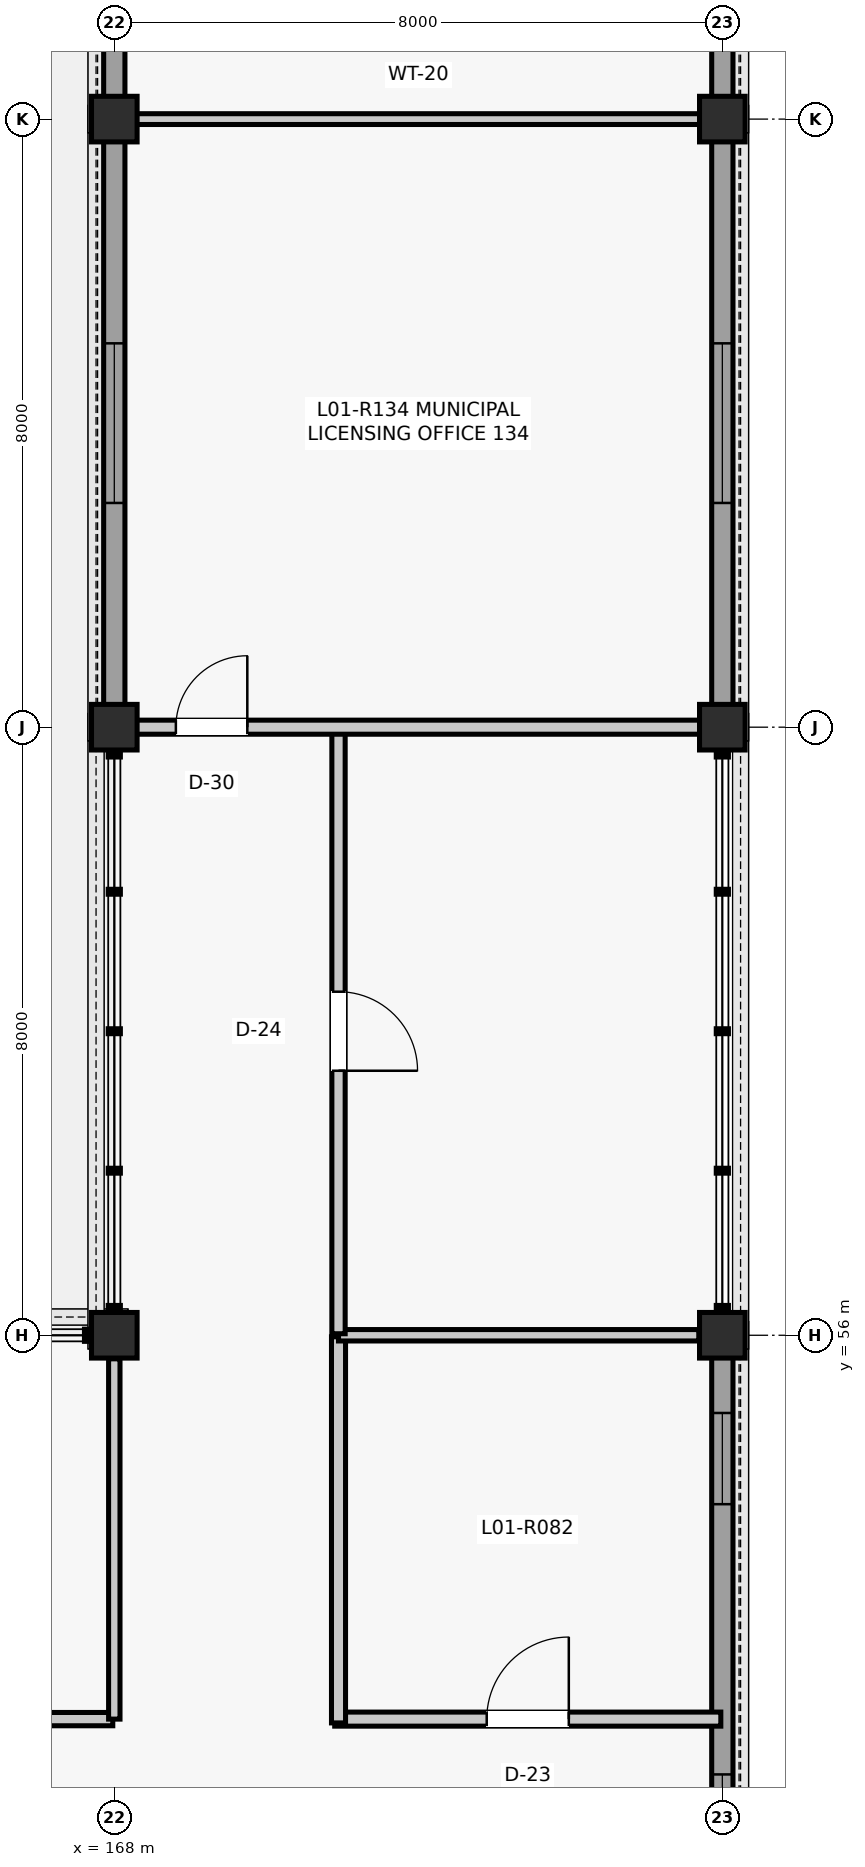
"""IFC4 building model, lengths in metres.
Left out: names, types, materials, properties, quantities, classifications, styles, units other than length and angle.
Written with IfcOpenShell. Run it as: python <this file> out.ifc"""

import sys

from ifc_helpers import new_model, si_unit, direction, frame, frame_2d, origin, origin_2d, place, context, subcontext, project, spatial, rectangle, extrude, element, fill, save


model = new_model("IFC4")
c1 = context("Model", 3, precision=1e-05, world=origin(), true_north=direction((0.0, 1.0)))
c2 = subcontext(c1, "Body", "Model", "MODEL_VIEW")
j1 = project(units=[si_unit("LENGTHUNIT", "METRE"), si_unit("PLANEANGLEUNIT", "RADIAN")], contexts=[c1])
p1 = place(None, origin())
s1 = spatial("IfcSite", under=j1, at=p1, CompositionType="ELEMENT")
p2 = place(p1, origin())
s2 = spatial("IfcBuilding", under=s1, at=p2, CompositionType="ELEMENT")
p3 = place(p2, frame((0.0, 0.0, 5.28)))
s3 = spatial("IfcBuildingStorey", under=s2, at=p3, CompositionType="ELEMENT", Elevation=5.28)
for number, where, z_axis, x_axis in (
    (1, (168.0, 56.0, 0.0), (0.0, 0.0, 1.0), (1.0, 0.0, 0.0)),
    (2, (168.0, 64.0, 0.0), (0.0, 0.0, 1.0), (1.0, 0.0, 0.0)),
    (3, (168.0, 72.0, 0.0), (0.0, 0.0, 1.0), (1.0, 0.0, 0.0)),
    (4, (176.0, 56.0, 0.0), (0.0, 0.0, 1.0), (1.0, 0.0, 0.0)),
    (5, (176.0, 64.0, 0.0), (0.0, 0.0, 1.0), (1.0, 0.0, 0.0)),
    (6, (176.0, 72.0, 0.0), (0.0, 0.0, 1.0), (1.0, 0.0, 0.0)),
):
    element("IfcColumn", number, at=place(p3, frame(where, z_axis=z_axis, x_axis=x_axis)), inside=s3, PredefinedType="COLUMN", context=c2, shape_type="SweptSolid", body=[
        extrude(rectangle(XDim=0.6, YDim=0.6, at=origin_2d()), origin(), (0.0, 0.0, 1.0), 4.62),
    ])
p4 = place(p3, frame((176.0, 48.285, 0.0), z_axis=(0.0, 0.0, 1.0), x_axis=(0.0, 1.0, 0.0)))
e7 = element("IfcWall", 7, at=p4, inside=s3, PredefinedType="SOLIDWALL", context=c2, shape_type="SweptSolid", body=[
    extrude(rectangle(XDim=7.43, YDim=0.28, at=frame_2d((3.715, 0.0))), origin(), (0.0, 0.0, 1.0), 3.974),
])
p5 = place(p4, frame((0.737, 0.0, 0.95)))
e8 = element("IfcOpeningElement", 8, at=p5, cuts=e7, PredefinedType="OPENING", context=c2, shape_type="SweptSolid", body=[
    extrude(rectangle(XDim=1.2, YDim=1.8, at=frame_2d((0.6, 0.9))), frame((0.0, 0.15, 0.0), z_axis=(0.0, -1.0, 0.0), x_axis=(1.0, 0.0, 0.0)), (0.0, 0.0, 1.0), 0.3),
])
p6 = place(p4, frame((5.493, 0.0, 0.95)))
e9 = element("IfcOpeningElement", 9, at=p6, cuts=e7, PredefinedType="OPENING", context=c2, shape_type="SweptSolid", body=[
    extrude(rectangle(XDim=1.2, YDim=1.8, at=frame_2d((0.6, 0.9))), frame((0.0, 0.15, 0.0), z_axis=(0.0, -1.0, 0.0), x_axis=(1.0, 0.0, 0.0)), (0.0, 0.0, 1.0), 0.3),
])
p7 = place(p3, frame((168.0, 64.285, 0.0), z_axis=(0.0, 0.0, 1.0), x_axis=(0.0, 1.0, 0.0)))
e10 = element("IfcWall", 10, at=p7, inside=s3, PredefinedType="SOLIDWALL", context=c2, shape_type="SweptSolid", body=[
    extrude(rectangle(XDim=7.43, YDim=0.28, at=frame_2d((3.715, 0.0))), origin(), (0.0, 0.0, 1.0), 3.914),
])
p8 = place(p7, frame((2.665, 0.0, 0.9)))
e11 = element("IfcOpeningElement", 11, at=p8, cuts=e10, PredefinedType="OPENING", context=c2, shape_type="SweptSolid", body=[
    extrude(rectangle(XDim=2.1, YDim=2.4, at=frame_2d((1.05, 1.2))), frame((0.0, 0.15, 0.0), z_axis=(0.0, -1.0, 0.0), x_axis=(1.0, 0.0, 0.0)), (0.0, 0.0, 1.0), 0.3),
])
p9 = place(p3, frame((176.0, 64.285, 0.0), z_axis=(0.0, 0.0, 1.0), x_axis=(0.0, 1.0, 0.0)))
e12 = element("IfcWall", 12, at=p9, inside=s3, PredefinedType="SOLIDWALL", context=c2, shape_type="SweptSolid", body=[
    extrude(rectangle(XDim=7.43, YDim=0.28, at=frame_2d((3.715, 0.0))), origin(), (0.0, 0.0, 1.0), 3.977),
])
p10 = place(p9, frame((2.665, 0.0, 0.9)))
e13 = element("IfcOpeningElement", 13, at=p10, cuts=e12, PredefinedType="OPENING", context=c2, shape_type="SweptSolid", body=[
    extrude(rectangle(XDim=2.1, YDim=2.4, at=frame_2d((1.05, 1.2))), frame((0.0, 0.15, 0.0), z_axis=(0.0, -1.0, 0.0), x_axis=(1.0, 0.0, 0.0)), (0.0, 0.0, 1.0), 0.3),
])
p11 = place(p3, frame((168.0, 72.285, 0.0), z_axis=(0.0, 0.0, 1.0), x_axis=(0.0, 1.0, 0.0)))
e14 = element("IfcWall", 14, at=p11, inside=s3, PredefinedType="SOLIDWALL", context=c2, shape_type="SweptSolid", body=[
    extrude(rectangle(XDim=7.355, YDim=0.28, at=frame_2d((3.677, 0.0))), origin(), (0.0, 0.0, 1.0), 3.977),
])
p12 = place(p11, frame((2.778, 0.0, 0.9)))
e15 = element("IfcOpeningElement", 15, at=p12, cuts=e14, PredefinedType="OPENING", context=c2, shape_type="SweptSolid", body=[
    extrude(rectangle(XDim=1.8, YDim=2.3, at=frame_2d((0.9, 1.15))), frame((0.0, 0.15, 0.0), z_axis=(0.0, -1.0, 0.0), x_axis=(1.0, 0.0, 0.0)), (0.0, 0.0, 1.0), 0.3),
])
p13 = place(p3, frame((176.0, 72.285, 0.0), z_axis=(0.0, 0.0, 1.0), x_axis=(0.0, 1.0, 0.0)))
e16 = element("IfcWall", 16, at=p13, inside=s3, PredefinedType="SOLIDWALL", context=c2, shape_type="SweptSolid", body=[
    extrude(rectangle(XDim=7.355, YDim=0.28, at=frame_2d((3.677, 0.0))), origin(), (0.0, 0.0, 1.0), 3.91),
])
p14 = place(p13, frame((2.778, 0.0, 0.9)))
e17 = element("IfcOpeningElement", 17, at=p14, cuts=e16, PredefinedType="OPENING", context=c2, shape_type="SweptSolid", body=[
    extrude(rectangle(XDim=1.8, YDim=2.3, at=frame_2d((0.9, 1.15))), frame((0.0, 0.15, 0.0), z_axis=(0.0, -1.0, 0.0), x_axis=(1.0, 0.0, 0.0)), (0.0, 0.0, 1.0), 0.3),
])
p15 = place(p3, frame((162.9, 50.95, 0.0), z_axis=(0.0, 0.0, 1.0), x_axis=(1.0, 0.0, 0.0)))
e18 = element("IfcWall", 18, at=p15, inside=s3, PredefinedType="PARTITIONING", context=c2, shape_type="SweptSolid", body=[
    extrude(rectangle(XDim=5.08, YDim=0.175, at=frame_2d((2.54, 0.0))), origin(), (0.0, 0.0, 1.0), 3.851),
])
p16 = place(p15, frame((2.03, 0.0, 0.0)))
e19 = element("IfcOpeningElement", 19, at=p16, cuts=e18, PredefinedType="OPENING", context=c2, shape_type="SweptSolid", body=[
    extrude(rectangle(XDim=1.02, YDim=2.2, at=frame_2d((0.51, 1.1))), frame((0.0, 0.097, 0.0), z_axis=(0.0, -1.0, 0.0), x_axis=(1.0, 0.0, 0.0)), (0.0, 0.0, 1.0), 0.195),
])
p17 = place(p3, frame((168.0, 50.95, 0.0), z_axis=(0.0, 0.0, 1.0), x_axis=(0.0, 1.0, 0.0)))
e20 = element("IfcWall", 20, at=p17, inside=s3, PredefinedType="PARTITIONING", context=c2, shape_type="SweptSolid", body=[
    extrude(rectangle(XDim=4.74, YDim=0.15, at=frame_2d((2.37, 0.0))), origin(), (0.0, 0.0, 1.0), 3.851),
])
p18 = place(p3, frame((170.9, 50.95, 0.0), z_axis=(0.0, 0.0, 1.0), x_axis=(1.0, 0.0, 0.0)))
e21 = element("IfcWall", 21, at=p18, inside=s3, PredefinedType="PARTITIONING", context=c2, shape_type="SweptSolid", body=[
    extrude(rectangle(XDim=5.08, YDim=0.185, at=frame_2d((2.54, 0.0))), origin(), (0.0, 0.0, 1.0), 3.967),
])
p19 = place(p18, frame((2.0, 0.0, 0.0)))
e22 = element("IfcOpeningElement", 22, at=p19, cuts=e21, PredefinedType="OPENING", context=c2, shape_type="SweptSolid", body=[
    extrude(rectangle(XDim=1.08, YDim=2.2, at=frame_2d((0.54, 1.1))), frame((0.0, 0.103, 0.0), z_axis=(0.0, -1.0, 0.0), x_axis=(1.0, 0.0, 0.0)), (0.0, 0.0, 1.0), 0.205),
])
p20 = place(p3, frame((170.95, 50.9, 0.0), z_axis=(0.0, 0.0, 1.0), x_axis=(0.0, 1.0, 0.0)))
e23 = element("IfcWall", 23, at=p20, inside=s3, PredefinedType="PARTITIONING", context=c2, shape_type="SweptSolid", body=[
    extrude(rectangle(XDim=5.08, YDim=0.185, at=frame_2d((2.54, 0.0))), origin(), (0.0, 0.0, 1.0), 3.712),
])
p21 = place(p3, frame((170.95, 56.0, 0.0), z_axis=(0.0, 0.0, 1.0), x_axis=(1.0, 0.0, 0.0)))
e24 = element("IfcWall", 24, at=p21, inside=s3, PredefinedType="PARTITIONING", context=c2, shape_type="SweptSolid", body=[
    extrude(rectangle(XDim=4.74, YDim=0.15, at=frame_2d((2.37, 0.0))), origin(), (0.0, 0.0, 1.0), 3.712),
])
p22 = place(p3, frame((170.95, 56.02, 0.0), z_axis=(0.0, 0.0, 1.0), x_axis=(0.0, 1.0, 0.0)))
e25 = element("IfcWall", 25, at=p22, inside=s3, PredefinedType="PARTITIONING", context=c2, shape_type="SweptSolid", body=[
    extrude(rectangle(XDim=7.96, YDim=0.175, at=frame_2d((3.98, 0.0))), origin(), (0.0, 0.0, 1.0), 3.712),
])
p23 = place(p22, frame((3.46, 0.0, 0.0)))
e26 = element("IfcOpeningElement", 26, at=p23, cuts=e25, PredefinedType="OPENING", context=c2, shape_type="SweptSolid", body=[
    extrude(rectangle(XDim=1.04, YDim=2.18, at=frame_2d((0.52, 1.09))), frame((0.0, 0.097, 0.0), z_axis=(0.0, -1.0, 0.0), x_axis=(1.0, 0.0, 0.0)), (0.0, 0.0, 1.0), 0.195),
])
p24 = place(p3, frame((168.29, 64.0, 0.0), z_axis=(0.0, 0.0, 1.0), x_axis=(1.0, 0.0, 0.0)))
e27 = element("IfcWall", 27, at=p24, inside=s3, PredefinedType="PARTITIONING", context=c2, shape_type="SweptSolid", body=[
    extrude(rectangle(XDim=7.42, YDim=0.185, at=frame_2d((3.71, 0.0))), origin(), (0.0, 0.0, 1.0), 3.787),
])
p25 = place(p24, frame((0.52, 0.0, 0.0)))
e28 = element("IfcOpeningElement", 28, at=p25, cuts=e27, PredefinedType="OPENING", context=c2, shape_type="SweptSolid", body=[
    extrude(rectangle(XDim=0.94, YDim=2.12, at=frame_2d((0.47, 1.06))), frame((0.0, 0.103, 0.0), z_axis=(0.0, -1.0, 0.0), x_axis=(1.0, 0.0, 0.0)), (0.0, 0.0, 1.0), 0.205),
])
p26 = place(p3, frame((168.29, 72.0, 0.0), z_axis=(0.0, 0.0, 1.0), x_axis=(1.0, 0.0, 0.0)))
e29 = element("IfcWall", 29, at=p26, inside=s3, PredefinedType="PARTITIONING", context=c2, shape_type="SweptSolid", body=[
    extrude(rectangle(XDim=7.42, YDim=0.142, at=frame_2d((3.71, 0.0))), origin(), (0.0, 0.0, 1.0), 3.771),
])
p27 = place(p5, origin())
e30 = element("IfcWindow", 30, at=p27, inside=s3, PartitioningType="SINGLE_PANEL", PredefinedType="WINDOW", context=c2, shape_type="SweptSolid", body=[
    extrude(rectangle(XDim=1.2, YDim=1.8, at=frame_2d((0.6, 0.9))), frame((0.0, 0.03, 0.0), z_axis=(0.0, -1.0, 0.0), x_axis=(1.0, 0.0, 0.0)), (0.0, 0.0, 1.0), 0.06),
])
fill(e8, e30)
p28 = place(p6, origin())
e31 = element("IfcWindow", 31, at=p28, inside=s3, PartitioningType="SINGLE_PANEL", PredefinedType="WINDOW", context=c2, shape_type="SweptSolid", body=[
    extrude(rectangle(XDim=1.2, YDim=1.8, at=frame_2d((0.6, 0.9))), frame((0.0, 0.03, 0.0), z_axis=(0.0, -1.0, 0.0), x_axis=(1.0, 0.0, 0.0)), (0.0, 0.0, 1.0), 0.06),
])
fill(e9, e31)
p29 = place(p8, origin())
e32 = element("IfcWindow", 32, at=p29, inside=s3, PartitioningType="SINGLE_PANEL", PredefinedType="WINDOW", context=c2, shape_type="SweptSolid", body=[
    extrude(rectangle(XDim=2.1, YDim=2.4, at=frame_2d((1.05, 1.2))), frame((0.0, 0.03, 0.0), z_axis=(0.0, -1.0, 0.0), x_axis=(1.0, 0.0, 0.0)), (0.0, 0.0, 1.0), 0.06),
])
fill(e11, e32)
p30 = place(p10, origin())
e33 = element("IfcWindow", 33, at=p30, inside=s3, PartitioningType="SINGLE_PANEL", PredefinedType="WINDOW", context=c2, shape_type="SweptSolid", body=[
    extrude(rectangle(XDim=2.1, YDim=2.4, at=frame_2d((1.05, 1.2))), frame((0.0, 0.03, 0.0), z_axis=(0.0, -1.0, 0.0), x_axis=(1.0, 0.0, 0.0)), (0.0, 0.0, 1.0), 0.06),
])
fill(e13, e33)
p31 = place(p19, origin())
e34 = element("IfcDoor", 34, at=p31, inside=s3, OperationType="SINGLE_SWING_RIGHT", PredefinedType="DOOR", context=c2, shape_type="SweptSolid", body=[
    extrude(rectangle(XDim=1.08, YDim=2.2, at=frame_2d((0.54, 1.1))), frame((0.0, 0.025, 0.0), z_axis=(0.0, -1.0, 0.0), x_axis=(1.0, 0.0, 0.0)), (0.0, 0.0, 1.0), 0.05),
])
fill(e22, e34)
p32 = place(p23, frame((1.04, 0.0, 0.0), z_axis=(0.0, 0.0, 1.0), x_axis=(-1.0, 0.0, 0.0)))
e35 = element("IfcDoor", 35, at=p32, inside=s3, OperationType="SINGLE_SWING_LEFT", PredefinedType="DOOR", context=c2, shape_type="SweptSolid", body=[
    extrude(rectangle(XDim=1.04, YDim=2.18, at=frame_2d((0.52, 1.09))), frame((0.0, 0.025, 0.0), z_axis=(0.0, -1.0, 0.0), x_axis=(1.0, 0.0, 0.0)), (0.0, 0.0, 1.0), 0.05),
])
fill(e26, e35)
p33 = place(p25, origin())
e36 = element("IfcDoor", 36, at=p33, inside=s3, OperationType="SINGLE_SWING_RIGHT", PredefinedType="DOOR", context=c2, shape_type="SweptSolid", body=[
    extrude(rectangle(XDim=0.94, YDim=2.12, at=frame_2d((0.47, 1.06))), frame((0.0, 0.025, 0.0), z_axis=(0.0, -1.0, 0.0), x_axis=(1.0, 0.0, 0.0)), (0.0, 0.0, 1.0), 0.05),
])
fill(e28, e36)
save(model, sys.argv[1])
